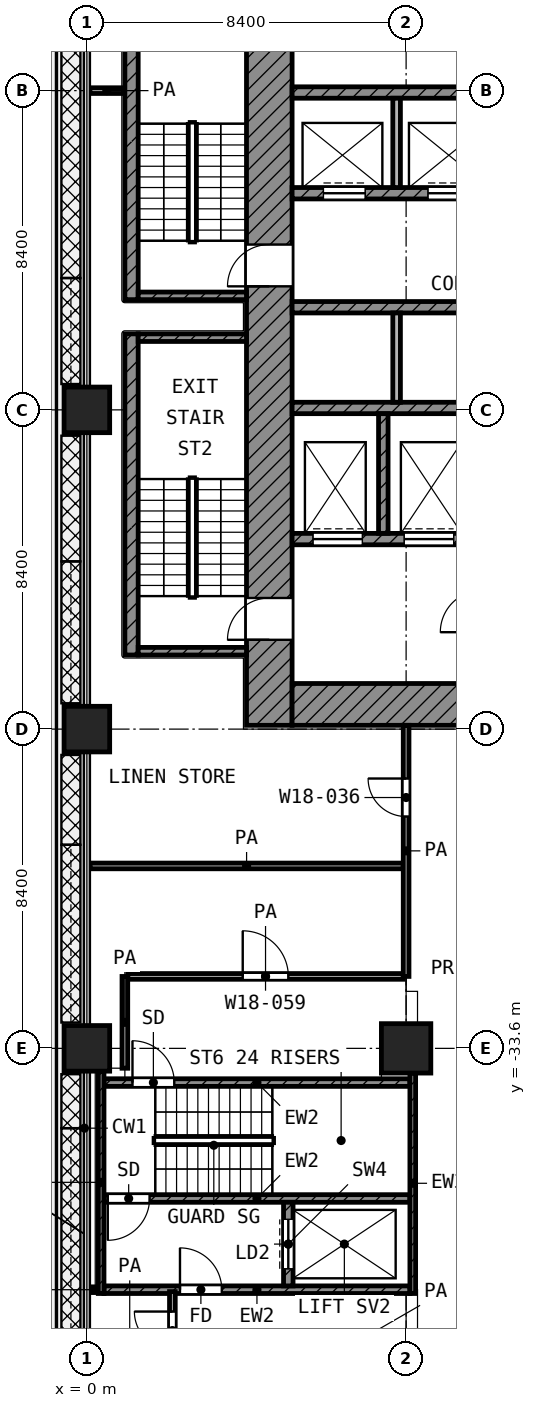
"""IFC4 building model, lengths in metres.
Left out: names, types, materials, properties, quantities, classifications, styles, units other than length and angle.
Written with IfcOpenShell. Run it as: python <this file> out.ifc"""

import sys

from ifc_helpers import new_model, si_unit, direction, frame, frame_2d, origin, origin_2d, place, context, subcontext, project, spatial, rectangle, extrude, element, fill, save


model = new_model("IFC4")
c1 = context("Model", 3, precision=1e-05, world=origin(), true_north=direction((0.0, 1.0)))
c2 = subcontext(c1, "Body", "Model", "MODEL_VIEW")
j1 = project(units=[si_unit("LENGTHUNIT", "METRE"), si_unit("PLANEANGLEUNIT", "RADIAN")], contexts=[c1])
p1 = place(None, origin())
s1 = spatial("IfcSite", under=j1, at=p1, CompositionType="ELEMENT")
p2 = place(p1, origin())
s2 = spatial("IfcBuilding", under=s1, at=p2, CompositionType="ELEMENT")
p3 = place(p2, frame((0.0, 0.0, 81.2)))
s3 = spatial("IfcBuildingStorey", under=s2, at=p3, CompositionType="ELEMENT", Elevation=81.2)
for number, where, z_axis, x_axis in (
    (1, (0.0, -16.8, 0.0), (0.0, 0.0, 1.0), (1.0, 0.0, 0.0)),
    (2, (0.0, -25.2, 0.0), (0.0, 0.0, 1.0), (1.0, 0.0, 0.0)),
    (3, (0.0, -33.6, 0.0), (0.0, 0.0, 1.0), (1.0, 0.0, 0.0)),
):
    element("IfcColumn", number, at=place(p3, frame(where, z_axis=z_axis, x_axis=x_axis)), inside=s3, PredefinedType="COLUMN", context=c2, shape_type="SweptSolid", body=[
        extrude(rectangle(XDim=1.2, YDim=1.2, at=origin_2d()), origin(), (0.0, 0.0, 1.0), 4.2),
    ])
p4 = place(p3, frame((8.4, -33.6, 0.0), z_axis=(0.0, 0.0, 1.0), x_axis=(1.0, 0.0, 0.0)))
e4 = element("IfcColumn", 4, at=p4, inside=s3, PredefinedType="COLUMN", context=c2, shape_type="SweptSolid", body=[
    extrude(rectangle(XDim=1.3, YDim=1.3, at=origin_2d()), origin(), (0.0, 0.0, 1.0), 4.2),
])
p5 = place(p3, frame((4.8, -25.1, 0.0), z_axis=(0.0, 0.0, 1.0), x_axis=(0.0, 1.0, 0.0)))
e5 = element("IfcWall", 5, at=p5, inside=s3, PredefinedType="SHEAR", context=c2, shape_type="SweptSolid", body=[
    extrude(rectangle(XDim=19.7, YDim=1.2, at=frame_2d((9.85, 0.0))), origin(), (0.0, 0.0, 1.0), 3.9),
])
p6 = place(p5, frame((11.55, 0.0, 0.0)))
e6 = element("IfcOpeningElement", 6, at=p6, cuts=e5, PredefinedType="OPENING", context=c2, shape_type="SweptSolid", body=[
    extrude(rectangle(XDim=1.1, YDim=2.1, at=frame_2d((0.55, 1.05))), frame((0.0, 0.61, 0.0), z_axis=(0.0, -1.0, 0.0), x_axis=(1.0, 0.0, 0.0)), (0.0, 0.0, 1.0), 1.22),
])
p7 = place(p5, frame((2.25, 0.0, 0.0)))
e7 = element("IfcOpeningElement", 7, at=p7, cuts=e5, PredefinedType="OPENING", context=c2, shape_type="SweptSolid", body=[
    extrude(rectangle(XDim=1.1, YDim=2.1, at=frame_2d((0.55, 1.05))), frame((0.0, 0.61, 0.0), z_axis=(0.0, -1.0, 0.0), x_axis=(1.0, 0.0, 0.0)), (0.0, 0.0, 1.0), 1.22),
])
p8 = place(p3, frame((5.4, -24.55, 0.0), z_axis=(0.0, 0.0, 1.0), x_axis=(1.0, 0.0, 0.0)))
e8 = element("IfcWall", 8, at=p8, inside=s3, PredefinedType="SHEAR", context=c2, shape_type="SweptSolid", body=[
    extrude(rectangle(XDim=18.6, YDim=1.1, at=frame_2d((9.3, 0.0))), origin(), (0.0, 0.0, 1.0), 3.9),
])
p9 = place(p8, frame((6.3, 0.0, 0.0)))
e9 = element("IfcOpeningElement", 9, at=p9, cuts=e8, PredefinedType="OPENING", context=c2, shape_type="SweptSolid", body=[
    extrude(rectangle(XDim=1.8, YDim=2.1, at=frame_2d((0.9, 1.05))), frame((0.0, 0.56, 0.0), z_axis=(0.0, -1.0, 0.0), x_axis=(1.0, 0.0, 0.0)), (0.0, 0.0, 1.0), 1.12),
])
p10 = place(p3, frame((5.4, -8.45, 0.0), z_axis=(0.0, 0.0, 1.0), x_axis=(1.0, 0.0, 0.0)))
e10 = element("IfcWall", 10, at=p10, inside=s3, PredefinedType="SHEAR", context=c2, shape_type="SweptSolid", body=[
    extrude(rectangle(XDim=16.65, YDim=0.3, at=frame_2d((8.325, 0.0))), origin(), (0.0, 0.0, 1.0), 3.9),
])
p11 = place(p3, frame((5.4, -11.1, 0.0), z_axis=(0.0, 0.0, 1.0), x_axis=(1.0, 0.0, 0.0)))
e11 = element("IfcWall", 11, at=p11, inside=s3, PredefinedType="SHEAR", context=c2, shape_type="SweptSolid", body=[
    extrude(rectangle(XDim=16.65, YDim=0.3, at=frame_2d((8.325, 0.0))), origin(), (0.0, 0.0, 1.0), 3.9),
])
p12 = place(p11, frame((0.825, 0.0, 0.0)))
e12 = element("IfcOpeningElement", 12, at=p12, cuts=e11, PredefinedType="OPENING", context=c2, shape_type="SweptSolid", body=[
    extrude(rectangle(XDim=1.1, YDim=2.1, at=frame_2d((0.55, 1.05))), frame((0.0, 0.16, 0.0), z_axis=(0.0, -1.0, 0.0), x_axis=(1.0, 0.0, 0.0)), (0.0, 0.0, 1.0), 0.32),
])
p13 = place(p11, frame((3.575, 0.0, 0.0)))
e13 = element("IfcOpeningElement", 13, at=p13, cuts=e11, PredefinedType="OPENING", context=c2, shape_type="SweptSolid", body=[
    extrude(rectangle(XDim=1.1, YDim=2.1, at=frame_2d((0.55, 1.05))), frame((0.0, 0.16, 0.0), z_axis=(0.0, -1.0, 0.0), x_axis=(1.0, 0.0, 0.0)), (0.0, 0.0, 1.0), 0.32),
])
p14 = place(p11, frame((6.325, 0.0, 0.0)))
e14 = element("IfcOpeningElement", 14, at=p14, cuts=e11, PredefinedType="OPENING", context=c2, shape_type="SweptSolid", body=[
    extrude(rectangle(XDim=1.1, YDim=2.1, at=frame_2d((0.55, 1.05))), frame((0.0, 0.16, 0.0), z_axis=(0.0, -1.0, 0.0), x_axis=(1.0, 0.0, 0.0)), (0.0, 0.0, 1.0), 0.32),
])
p15 = place(p11, frame((9.075, 0.0, 0.0)))
e15 = element("IfcOpeningElement", 15, at=p15, cuts=e11, PredefinedType="OPENING", context=c2, shape_type="SweptSolid", body=[
    extrude(rectangle(XDim=1.1, YDim=2.1, at=frame_2d((0.55, 1.05))), frame((0.0, 0.16, 0.0), z_axis=(0.0, -1.0, 0.0), x_axis=(1.0, 0.0, 0.0)), (0.0, 0.0, 1.0), 0.32),
])
for number, where, z_axis, x_axis in (
    (16, (5.4, -14.1, 0.0), (0.0, 0.0, 1.0), (1.0, 0.0, 0.0)),
    (17, (5.4, -16.75, 0.0), (0.0, 0.0, 1.0), (1.0, 0.0, 0.0)),
):
    element("IfcWall", number, at=place(p3, frame(where, z_axis=z_axis, x_axis=x_axis)), inside=s3, PredefinedType="SHEAR", context=c2, shape_type="SweptSolid", body=[
        extrude(rectangle(XDim=16.65, YDim=0.3, at=frame_2d((8.325, 0.0))), origin(), (0.0, 0.0, 1.0), 3.9),
    ])
p16 = place(p3, frame((5.4, -20.2, 0.0), z_axis=(0.0, 0.0, 1.0), x_axis=(1.0, 0.0, 0.0)))
e18 = element("IfcWall", 18, at=p16, inside=s3, PredefinedType="SHEAR", context=c2, shape_type="SweptSolid", body=[
    extrude(rectangle(XDim=14.65, YDim=0.3, at=frame_2d((7.325, 0.0))), origin(), (0.0, 0.0, 1.0), 3.9),
])
p17 = place(p16, frame((10.55, 0.0, 0.0)))
e19 = element("IfcOpeningElement", 19, at=p17, cuts=e18, PredefinedType="OPENING", context=c2, shape_type="SweptSolid", body=[
    extrude(rectangle(XDim=1.3, YDim=2.1, at=frame_2d((0.65, 1.05))), frame((0.0, 0.16, 0.0), z_axis=(0.0, -1.0, 0.0), x_axis=(1.0, 0.0, 0.0)), (0.0, 0.0, 1.0), 0.32),
])
p18 = place(p16, frame((12.95, 0.0, 0.0)))
e20 = element("IfcOpeningElement", 20, at=p18, cuts=e18, PredefinedType="OPENING", context=c2, shape_type="SweptSolid", body=[
    extrude(rectangle(XDim=1.3, YDim=2.1, at=frame_2d((0.65, 1.05))), frame((0.0, 0.16, 0.0), z_axis=(0.0, -1.0, 0.0), x_axis=(1.0, 0.0, 0.0)), (0.0, 0.0, 1.0), 0.32),
])
p19 = place(p16, frame((0.55, 0.0, 0.0)))
e21 = element("IfcOpeningElement", 21, at=p19, cuts=e18, PredefinedType="OPENING", context=c2, shape_type="SweptSolid", body=[
    extrude(rectangle(XDim=1.3, YDim=2.1, at=frame_2d((0.65, 1.05))), frame((0.0, 0.16, 0.0), z_axis=(0.0, -1.0, 0.0), x_axis=(1.0, 0.0, 0.0)), (0.0, 0.0, 1.0), 0.32),
])
p20 = place(p16, frame((2.95, 0.0, 0.0)))
e22 = element("IfcOpeningElement", 22, at=p20, cuts=e18, PredefinedType="OPENING", context=c2, shape_type="SweptSolid", body=[
    extrude(rectangle(XDim=1.3, YDim=2.1, at=frame_2d((0.65, 1.05))), frame((0.0, 0.16, 0.0), z_axis=(0.0, -1.0, 0.0), x_axis=(1.0, 0.0, 0.0)), (0.0, 0.0, 1.0), 0.32),
])
p21 = place(p16, frame((7.15, 0.0, 0.0)))
e23 = element("IfcOpeningElement", 23, at=p21, cuts=e18, PredefinedType="OPENING", context=c2, shape_type="SweptSolid", body=[
    extrude(rectangle(XDim=0.9, YDim=2.1, at=frame_2d((0.45, 1.05))), frame((0.0, 0.16, 0.0), z_axis=(0.0, -1.0, 0.0), x_axis=(1.0, 0.0, 0.0)), (0.0, 0.0, 1.0), 0.32),
])
p22 = place(p3, frame((7.8, -20.05, 0.0), z_axis=(0.0, 0.0, 1.0), x_axis=(0.0, 1.0, 0.0)))
e24 = element("IfcWall", 24, at=p22, inside=s3, PredefinedType="SHEAR", context=c2, shape_type="SweptSolid", body=[
    extrude(rectangle(XDim=3.15, YDim=0.25, at=frame_2d((1.575, 0.0))), origin(), (0.0, 0.0, 1.0), 3.9),
])
p23 = place(p3, frame((8.15, -10.95, 0.0), z_axis=(0.0, 0.0, 1.0), x_axis=(0.0, 1.0, 0.0)))
e25 = element("IfcWall", 25, at=p23, inside=s3, PredefinedType="PARTITIONING", context=c2, shape_type="SweptSolid", body=[
    extrude(rectangle(XDim=2.35, YDim=0.2, at=frame_2d((1.175, 0.0))), origin(), (0.0, 0.0, 1.0), 3.9),
])
p24 = place(p3, frame((8.15, -16.6, 0.0), z_axis=(0.0, 0.0, 1.0), x_axis=(0.0, 1.0, 0.0)))
e26 = element("IfcWall", 26, at=p24, inside=s3, PredefinedType="PARTITIONING", context=c2, shape_type="SweptSolid", body=[
    extrude(rectangle(XDim=2.35, YDim=0.2, at=frame_2d((1.175, 0.0))), origin(), (0.0, 0.0, 1.0), 3.9),
])
p25 = place(p3, frame((1.175, -13.9, 0.0), z_axis=(0.0, 0.0, 1.0), x_axis=(0.0, 1.0, 0.0)))
e27 = element("IfcWall", 27, at=p25, inside=s3, PredefinedType="SHEAR", context=c2, shape_type="SweptSolid", body=[
    extrude(rectangle(XDim=8.45, YDim=0.35, at=frame_2d((4.225, 0.0))), origin(), (0.0, 0.0, 1.0), 3.9),
])
p26 = place(p3, frame((1.35, -13.8, 0.0), z_axis=(0.0, 0.0, 1.0), x_axis=(1.0, 0.0, 0.0)))
e28 = element("IfcWall", 28, at=p26, inside=s3, PredefinedType="SHEAR", context=c2, shape_type="SweptSolid", body=[
    extrude(rectangle(XDim=2.85, YDim=0.2, at=frame_2d((1.425, 0.0))), origin(), (0.0, 0.0, 1.0), 3.9),
])
p27 = place(p3, frame((1.175, -23.25, 0.0), z_axis=(0.0, 0.0, 1.0), x_axis=(0.0, 1.0, 0.0)))
e29 = element("IfcWall", 29, at=p27, inside=s3, PredefinedType="SHEAR", context=c2, shape_type="SweptSolid", body=[
    extrude(rectangle(XDim=8.45, YDim=0.35, at=frame_2d((4.225, 0.0))), origin(), (0.0, 0.0, 1.0), 3.9),
])
for number, where, z_axis, x_axis in (
    (30, (1.35, -14.9, 0.0), (0.0, 0.0, 1.0), (1.0, 0.0, 0.0)),
    (31, (1.35, -23.15, 0.0), (0.0, 0.0, 1.0), (1.0, 0.0, 0.0)),
):
    element("IfcWall", number, at=place(p3, frame(where, z_axis=z_axis, x_axis=x_axis)), inside=s3, PredefinedType="SHEAR", context=c2, shape_type="SweptSolid", body=[
        extrude(rectangle(XDim=2.85, YDim=0.2, at=frame_2d((1.425, 0.0))), origin(), (0.0, 0.0, 1.0), 3.9),
    ])
p28 = place(p3, frame((0.375, -40.05, 0.0), z_axis=(0.0, 0.0, 1.0), x_axis=(0.0, 1.0, 0.0)))
e32 = element("IfcWall", 32, at=p28, inside=s3, PredefinedType="SHEAR", context=c2, shape_type="SweptSolid", body=[
    extrude(rectangle(XDim=5.85, YDim=0.15, at=frame_2d((2.925, 0.0))), origin(), (0.0, 0.0, 1.0), 3.9),
])
p29 = place(p3, frame((8.575, -40.05, 0.0), z_axis=(0.0, 0.0, 1.0), x_axis=(0.0, 1.0, 0.0)))
e33 = element("IfcWall", 33, at=p29, inside=s3, PredefinedType="SHEAR", context=c2, shape_type="SweptSolid", body=[
    extrude(rectangle(XDim=5.8, YDim=0.15, at=frame_2d((2.9, 0.0))), origin(), (0.0, 0.0, 1.0), 3.9),
])
p30 = place(p3, frame((0.45, -34.5, 0.0), z_axis=(0.0, 0.0, 1.0), x_axis=(1.0, 0.0, 0.0)))
e34 = element("IfcWall", 34, at=p30, inside=s3, PredefinedType="SHEAR", context=c2, shape_type="SweptSolid", body=[
    extrude(rectangle(XDim=8.05, YDim=0.2, at=frame_2d((4.025, 0.0))), origin(), (0.0, 0.0, 1.0), 3.9),
])
p31 = place(p30, frame((0.75, 0.0, 0.0)))
e35 = element("IfcOpeningElement", 35, at=p31, cuts=e34, PredefinedType="OPENING", context=c2, shape_type="SweptSolid", body=[
    extrude(rectangle(XDim=1.1, YDim=2.1, at=frame_2d((0.55, 1.05))), frame((0.0, 0.11, 0.0), z_axis=(0.0, -1.0, 0.0), x_axis=(1.0, 0.0, 0.0)), (0.0, 0.0, 1.0), 0.22),
])
p32 = place(p3, frame((0.45, -37.55, 0.0), z_axis=(0.0, 0.0, 1.0), x_axis=(1.0, 0.0, 0.0)))
e36 = element("IfcWall", 36, at=p32, inside=s3, PredefinedType="SHEAR", context=c2, shape_type="SweptSolid", body=[
    extrude(rectangle(XDim=8.05, YDim=0.2, at=frame_2d((4.025, 0.0))), origin(), (0.0, 0.0, 1.0), 3.9),
])
p33 = place(p32, frame((0.1, 0.0, 0.0)))
e37 = element("IfcOpeningElement", 37, at=p33, cuts=e36, PredefinedType="OPENING", context=c2, shape_type="SweptSolid", body=[
    extrude(rectangle(XDim=1.1, YDim=2.1, at=frame_2d((0.55, 1.05))), frame((0.0, 0.11, 0.0), z_axis=(0.0, -1.0, 0.0), x_axis=(1.0, 0.0, 0.0)), (0.0, 0.0, 1.0), 0.22),
])
p34 = place(p3, frame((0.45, -39.95, 0.0), z_axis=(0.0, 0.0, 1.0), x_axis=(1.0, 0.0, 0.0)))
e38 = element("IfcWall", 38, at=p34, inside=s3, PredefinedType="SHEAR", context=c2, shape_type="SweptSolid", body=[
    extrude(rectangle(XDim=8.05, YDim=0.2, at=frame_2d((4.025, 0.0))), origin(), (0.0, 0.0, 1.0), 3.9),
])
p35 = place(p34, frame((2.0, 0.0, 0.0)))
e39 = element("IfcOpeningElement", 39, at=p35, cuts=e38, PredefinedType="OPENING", context=c2, shape_type="SweptSolid", body=[
    extrude(rectangle(XDim=1.1, YDim=2.1, at=frame_2d((0.55, 1.05))), frame((0.0, 0.11, 0.0), z_axis=(0.0, -1.0, 0.0), x_axis=(1.0, 0.0, 0.0)), (0.0, 0.0, 1.0), 0.22),
])
p36 = place(p3, frame((5.3, -39.85, 0.0), z_axis=(0.0, 0.0, 1.0), x_axis=(0.0, 1.0, 0.0)))
e40 = element("IfcWall", 40, at=p36, inside=s3, PredefinedType="SHEAR", context=c2, shape_type="SweptSolid", body=[
    extrude(rectangle(XDim=2.2, YDim=0.25, at=frame_2d((1.1, 0.0))), origin(), (0.0, 0.0, 1.0), 3.9),
])
p37 = place(p36, frame((0.45, 0.0, 0.0)))
e41 = element("IfcOpeningElement", 41, at=p37, cuts=e40, PredefinedType="OPENING", context=c2, shape_type="SweptSolid", body=[
    extrude(rectangle(XDim=1.3, YDim=2.1, at=frame_2d((0.65, 1.05))), frame((0.0, 0.135, 0.0), z_axis=(0.0, -1.0, 0.0), x_axis=(1.0, 0.0, 0.0)), (0.0, 0.0, 1.0), 0.27),
])
p38 = place(p3, frame((0.08, -39.95, 0.0), z_axis=(0.0, 0.0, 1.0), x_axis=(1.0, 0.0, 0.0)))
e42 = element("IfcWall", 42, at=p38, inside=s3, PredefinedType="PARTITIONING", context=c2, shape_type="SweptSolid", body=[
    extrude(rectangle(XDim=0.19, YDim=0.15, at=frame_2d((0.095, 0.0))), origin(), (0.0, 0.0, 1.0), 3.9),
])
p39 = place(p3, frame((1.077, -31.707, 0.0), z_axis=(0.0, 0.0, 1.0), x_axis=(1.0, 0.0, 0.0)))
e43 = element("IfcWall", 43, at=p39, inside=s3, PredefinedType="PARTITIONING", context=c2, shape_type="SweptSolid", body=[
    extrude(rectangle(XDim=7.248, YDim=0.15, at=frame_2d((3.624, 0.0))), origin(), (0.0, 0.0, 1.0), 3.9),
])
p40 = place(p39, frame((3.024, 0.0, 0.0)))
e44 = element("IfcOpeningElement", 44, at=p40, cuts=e43, PredefinedType="OPENING", context=c2, shape_type="SweptSolid", body=[
    extrude(rectangle(XDim=1.2, YDim=2.1, at=frame_2d((0.6, 1.05))), frame((0.0, 0.085, 0.0), z_axis=(0.0, -1.0, 0.0), x_axis=(1.0, 0.0, 0.0)), (0.0, 0.0, 1.0), 0.17),
])
p41 = place(p3, frame((0.08, -28.8, 0.0), z_axis=(0.0, 0.0, 1.0), x_axis=(1.0, 0.0, 0.0)))
e45 = element("IfcWall", 45, at=p41, inside=s3, PredefinedType="PARTITIONING", context=c2, shape_type="SweptSolid", body=[
    extrude(rectangle(XDim=8.245, YDim=0.15, at=frame_2d((4.123, 0.0))), origin(), (0.0, 0.0, 1.0), 3.9),
])
p42 = place(p3, frame((0.08, -8.4, 0.0), z_axis=(0.0, 0.0, 1.0), x_axis=(1.0, 0.0, 0.0)))
e46 = element("IfcWall", 46, at=p42, inside=s3, PredefinedType="PARTITIONING", context=c2, shape_type="SweptSolid", body=[
    extrude(rectangle(XDim=0.89, YDim=0.15, at=frame_2d((0.445, 0.0))), origin(), (0.0, 0.0, 1.0), 3.9),
])
p43 = place(p3, frame((1.0, -34.123, 0.0), z_axis=(0.0, 0.0, 1.0), x_axis=(0.0, 1.0, 0.0)))
e47 = element("IfcWall", 47, at=p43, inside=s3, PredefinedType="PARTITIONING", context=c2, shape_type="SweptSolid", body=[
    extrude(rectangle(XDim=2.415, YDim=0.15, at=frame_2d((1.208, 0.0))), origin(), (0.0, 0.0, 1.0), 3.9),
])
p44 = place(p3, frame((2.25, -42.35, 0.0), z_axis=(0.0, 0.0, 1.0), x_axis=(0.0, 1.0, 0.0)))
e48 = element("IfcWall", 48, at=p44, inside=s3, PredefinedType="PARTITIONING", context=c2, shape_type="SweptSolid", body=[
    extrude(rectangle(XDim=2.35, YDim=0.15, at=frame_2d((1.175, 0.0))), origin(), (0.0, 0.0, 1.0), 3.9),
])
p45 = place(p44, frame((0.825, 0.0, 0.0)))
e49 = element("IfcOpeningElement", 49, at=p45, cuts=e48, PredefinedType="OPENING", context=c2, shape_type="SweptSolid", body=[
    extrude(rectangle(XDim=1.0, YDim=2.1, at=frame_2d((0.5, 1.05))), frame((0.0, 0.085, 0.0), z_axis=(0.0, -1.0, 0.0), x_axis=(1.0, 0.0, 0.0)), (0.0, 0.0, 1.0), 0.17),
])
p46 = place(p3, frame((8.4, -31.707, 0.0), z_axis=(0.0, 0.0, 1.0), x_axis=(0.0, 1.0, 0.0)))
e50 = element("IfcWall", 50, at=p46, inside=s3, PredefinedType="PARTITIONING", context=c2, shape_type="SweptSolid", body=[
    extrude(rectangle(XDim=6.607, YDim=0.15, at=frame_2d((3.303, 0.0))), origin(), (0.0, 0.0, 1.0), 3.9),
])
p47 = place(p46, frame((4.207, 0.0, 0.0)))
e51 = element("IfcOpeningElement", 51, at=p47, cuts=e50, PredefinedType="OPENING", context=c2, shape_type="SweptSolid", body=[
    extrude(rectangle(XDim=1.0, YDim=2.1, at=frame_2d((0.5, 1.05))), frame((0.0, 0.085, 0.0), z_axis=(0.0, -1.0, 0.0), x_axis=(1.0, 0.0, 0.0)), (0.0, 0.0, 1.0), 0.17),
])
p48 = place(p12, origin())
e52 = element("IfcDoor", 52, at=p48, inside=s3, OperationType="DOUBLE_DOOR_SLIDING", PredefinedType="DOOR", context=c2, shape_type="SweptSolid", body=[
    extrude(rectangle(XDim=1.1, YDim=2.1, at=frame_2d((0.55, 1.05))), frame((0.0, 0.025, 0.0), z_axis=(0.0, -1.0, 0.0), x_axis=(1.0, 0.0, 0.0)), (0.0, 0.0, 1.0), 0.05),
])
fill(e12, e52)
p49 = place(p13, origin())
e53 = element("IfcDoor", 53, at=p49, inside=s3, OperationType="DOUBLE_DOOR_SLIDING", PredefinedType="DOOR", context=c2, shape_type="SweptSolid", body=[
    extrude(rectangle(XDim=1.1, YDim=2.1, at=frame_2d((0.55, 1.05))), frame((0.0, 0.025, 0.0), z_axis=(0.0, -1.0, 0.0), x_axis=(1.0, 0.0, 0.0)), (0.0, 0.0, 1.0), 0.05),
])
fill(e13, e53)
p50 = place(p19, origin())
e54 = element("IfcDoor", 54, at=p50, inside=s3, OperationType="DOUBLE_DOOR_SLIDING", PredefinedType="DOOR", context=c2, shape_type="SweptSolid", body=[
    extrude(rectangle(XDim=1.3, YDim=2.1, at=frame_2d((0.65, 1.05))), frame((0.0, 0.025, 0.0), z_axis=(0.0, -1.0, 0.0), x_axis=(1.0, 0.0, 0.0)), (0.0, 0.0, 1.0), 0.05),
])
fill(e21, e54)
p51 = place(p20, origin())
e55 = element("IfcDoor", 55, at=p51, inside=s3, OperationType="DOUBLE_DOOR_SLIDING", PredefinedType="DOOR", context=c2, shape_type="SweptSolid", body=[
    extrude(rectangle(XDim=1.3, YDim=2.1, at=frame_2d((0.65, 1.05))), frame((0.0, 0.025, 0.0), z_axis=(0.0, -1.0, 0.0), x_axis=(1.0, 0.0, 0.0)), (0.0, 0.0, 1.0), 0.05),
])
fill(e22, e55)
p52 = place(p6, origin())
e56 = element("IfcDoor", 56, at=p52, inside=s3, OperationType="SINGLE_SWING_LEFT", PredefinedType="DOOR", context=c2, shape_type="SweptSolid", body=[
    extrude(rectangle(XDim=1.1, YDim=2.1, at=frame_2d((0.55, 1.05))), frame((0.0, 0.025, 0.0), z_axis=(0.0, -1.0, 0.0), x_axis=(1.0, 0.0, 0.0)), (0.0, 0.0, 1.0), 0.05),
])
fill(e6, e56)
p53 = place(p7, origin())
e57 = element("IfcDoor", 57, at=p53, inside=s3, OperationType="SINGLE_SWING_LEFT", PredefinedType="DOOR", context=c2, shape_type="SweptSolid", body=[
    extrude(rectangle(XDim=1.1, YDim=2.1, at=frame_2d((0.55, 1.05))), frame((0.0, 0.025, 0.0), z_axis=(0.0, -1.0, 0.0), x_axis=(1.0, 0.0, 0.0)), (0.0, 0.0, 1.0), 0.05),
])
fill(e7, e57)
p54 = place(p31, origin())
e58 = element("IfcDoor", 58, at=p54, inside=s3, OperationType="SINGLE_SWING_LEFT", PredefinedType="DOOR", context=c2, shape_type="SweptSolid", body=[
    extrude(rectangle(XDim=1.1, YDim=2.1, at=frame_2d((0.55, 1.05))), frame((0.0, 0.025, 0.0), z_axis=(0.0, -1.0, 0.0), x_axis=(1.0, 0.0, 0.0)), (0.0, 0.0, 1.0), 0.05),
])
fill(e35, e58)
p55 = place(p33, frame((1.1, 0.0, 0.0), z_axis=(0.0, 0.0, 1.0), x_axis=(-1.0, 0.0, 0.0)))
e59 = element("IfcDoor", 59, at=p55, inside=s3, OperationType="SINGLE_SWING_LEFT", PredefinedType="DOOR", context=c2, shape_type="SweptSolid", body=[
    extrude(rectangle(XDim=1.1, YDim=2.1, at=frame_2d((0.55, 1.05))), frame((0.0, 0.025, 0.0), z_axis=(0.0, -1.0, 0.0), x_axis=(1.0, 0.0, 0.0)), (0.0, 0.0, 1.0), 0.05),
])
fill(e37, e59)
p56 = place(p37, origin())
e60 = element("IfcDoor", 60, at=p56, inside=s3, OperationType="DOUBLE_DOOR_SLIDING", PredefinedType="DOOR", context=c2, shape_type="SweptSolid", body=[
    extrude(rectangle(XDim=1.3, YDim=2.1, at=frame_2d((0.65, 1.05))), frame((0.0, 0.025, 0.0), z_axis=(0.0, -1.0, 0.0), x_axis=(1.0, 0.0, 0.0)), (0.0, 0.0, 1.0), 0.05),
])
fill(e41, e60)
p57 = place(p35, origin())
e61 = element("IfcDoor", 61, at=p57, inside=s3, OperationType="SINGLE_SWING_LEFT", PredefinedType="DOOR", context=c2, shape_type="SweptSolid", body=[
    extrude(rectangle(XDim=1.1, YDim=2.1, at=frame_2d((0.55, 1.05))), frame((0.0, 0.025, 0.0), z_axis=(0.0, -1.0, 0.0), x_axis=(1.0, 0.0, 0.0)), (0.0, 0.0, 1.0), 0.05),
])
fill(e39, e61)
p58 = place(p47, origin())
e62 = element("IfcDoor", 62, at=p58, inside=s3, OperationType="SINGLE_SWING_RIGHT", PredefinedType="DOOR", context=c2, shape_type="SweptSolid", body=[
    extrude(rectangle(XDim=1.0, YDim=2.1, at=frame_2d((0.5, 1.05))), frame((0.0, 0.025, 0.0), z_axis=(0.0, -1.0, 0.0), x_axis=(1.0, 0.0, 0.0)), (0.0, 0.0, 1.0), 0.05),
])
fill(e51, e62)
p59 = place(p40, origin())
e63 = element("IfcDoor", 63, at=p59, inside=s3, OperationType="SINGLE_SWING_LEFT", PredefinedType="DOOR", context=c2, shape_type="SweptSolid", body=[
    extrude(rectangle(XDim=1.2, YDim=2.1, at=frame_2d((0.6, 1.05))), frame((0.0, 0.025, 0.0), z_axis=(0.0, -1.0, 0.0), x_axis=(1.0, 0.0, 0.0)), (0.0, 0.0, 1.0), 0.05),
])
fill(e44, e63)
p60 = place(p45, origin())
e64 = element("IfcDoor", 64, at=p60, inside=s3, OperationType="SINGLE_SWING_RIGHT", PredefinedType="DOOR", context=c2, shape_type="SweptSolid", body=[
    extrude(rectangle(XDim=1.0, YDim=2.1, at=frame_2d((0.5, 1.05))), frame((0.0, 0.025, 0.0), z_axis=(0.0, -1.0, 0.0), x_axis=(1.0, 0.0, 0.0)), (0.0, 0.0, 1.0), 0.05),
])
fill(e49, e64)
save(model, sys.argv[1])
